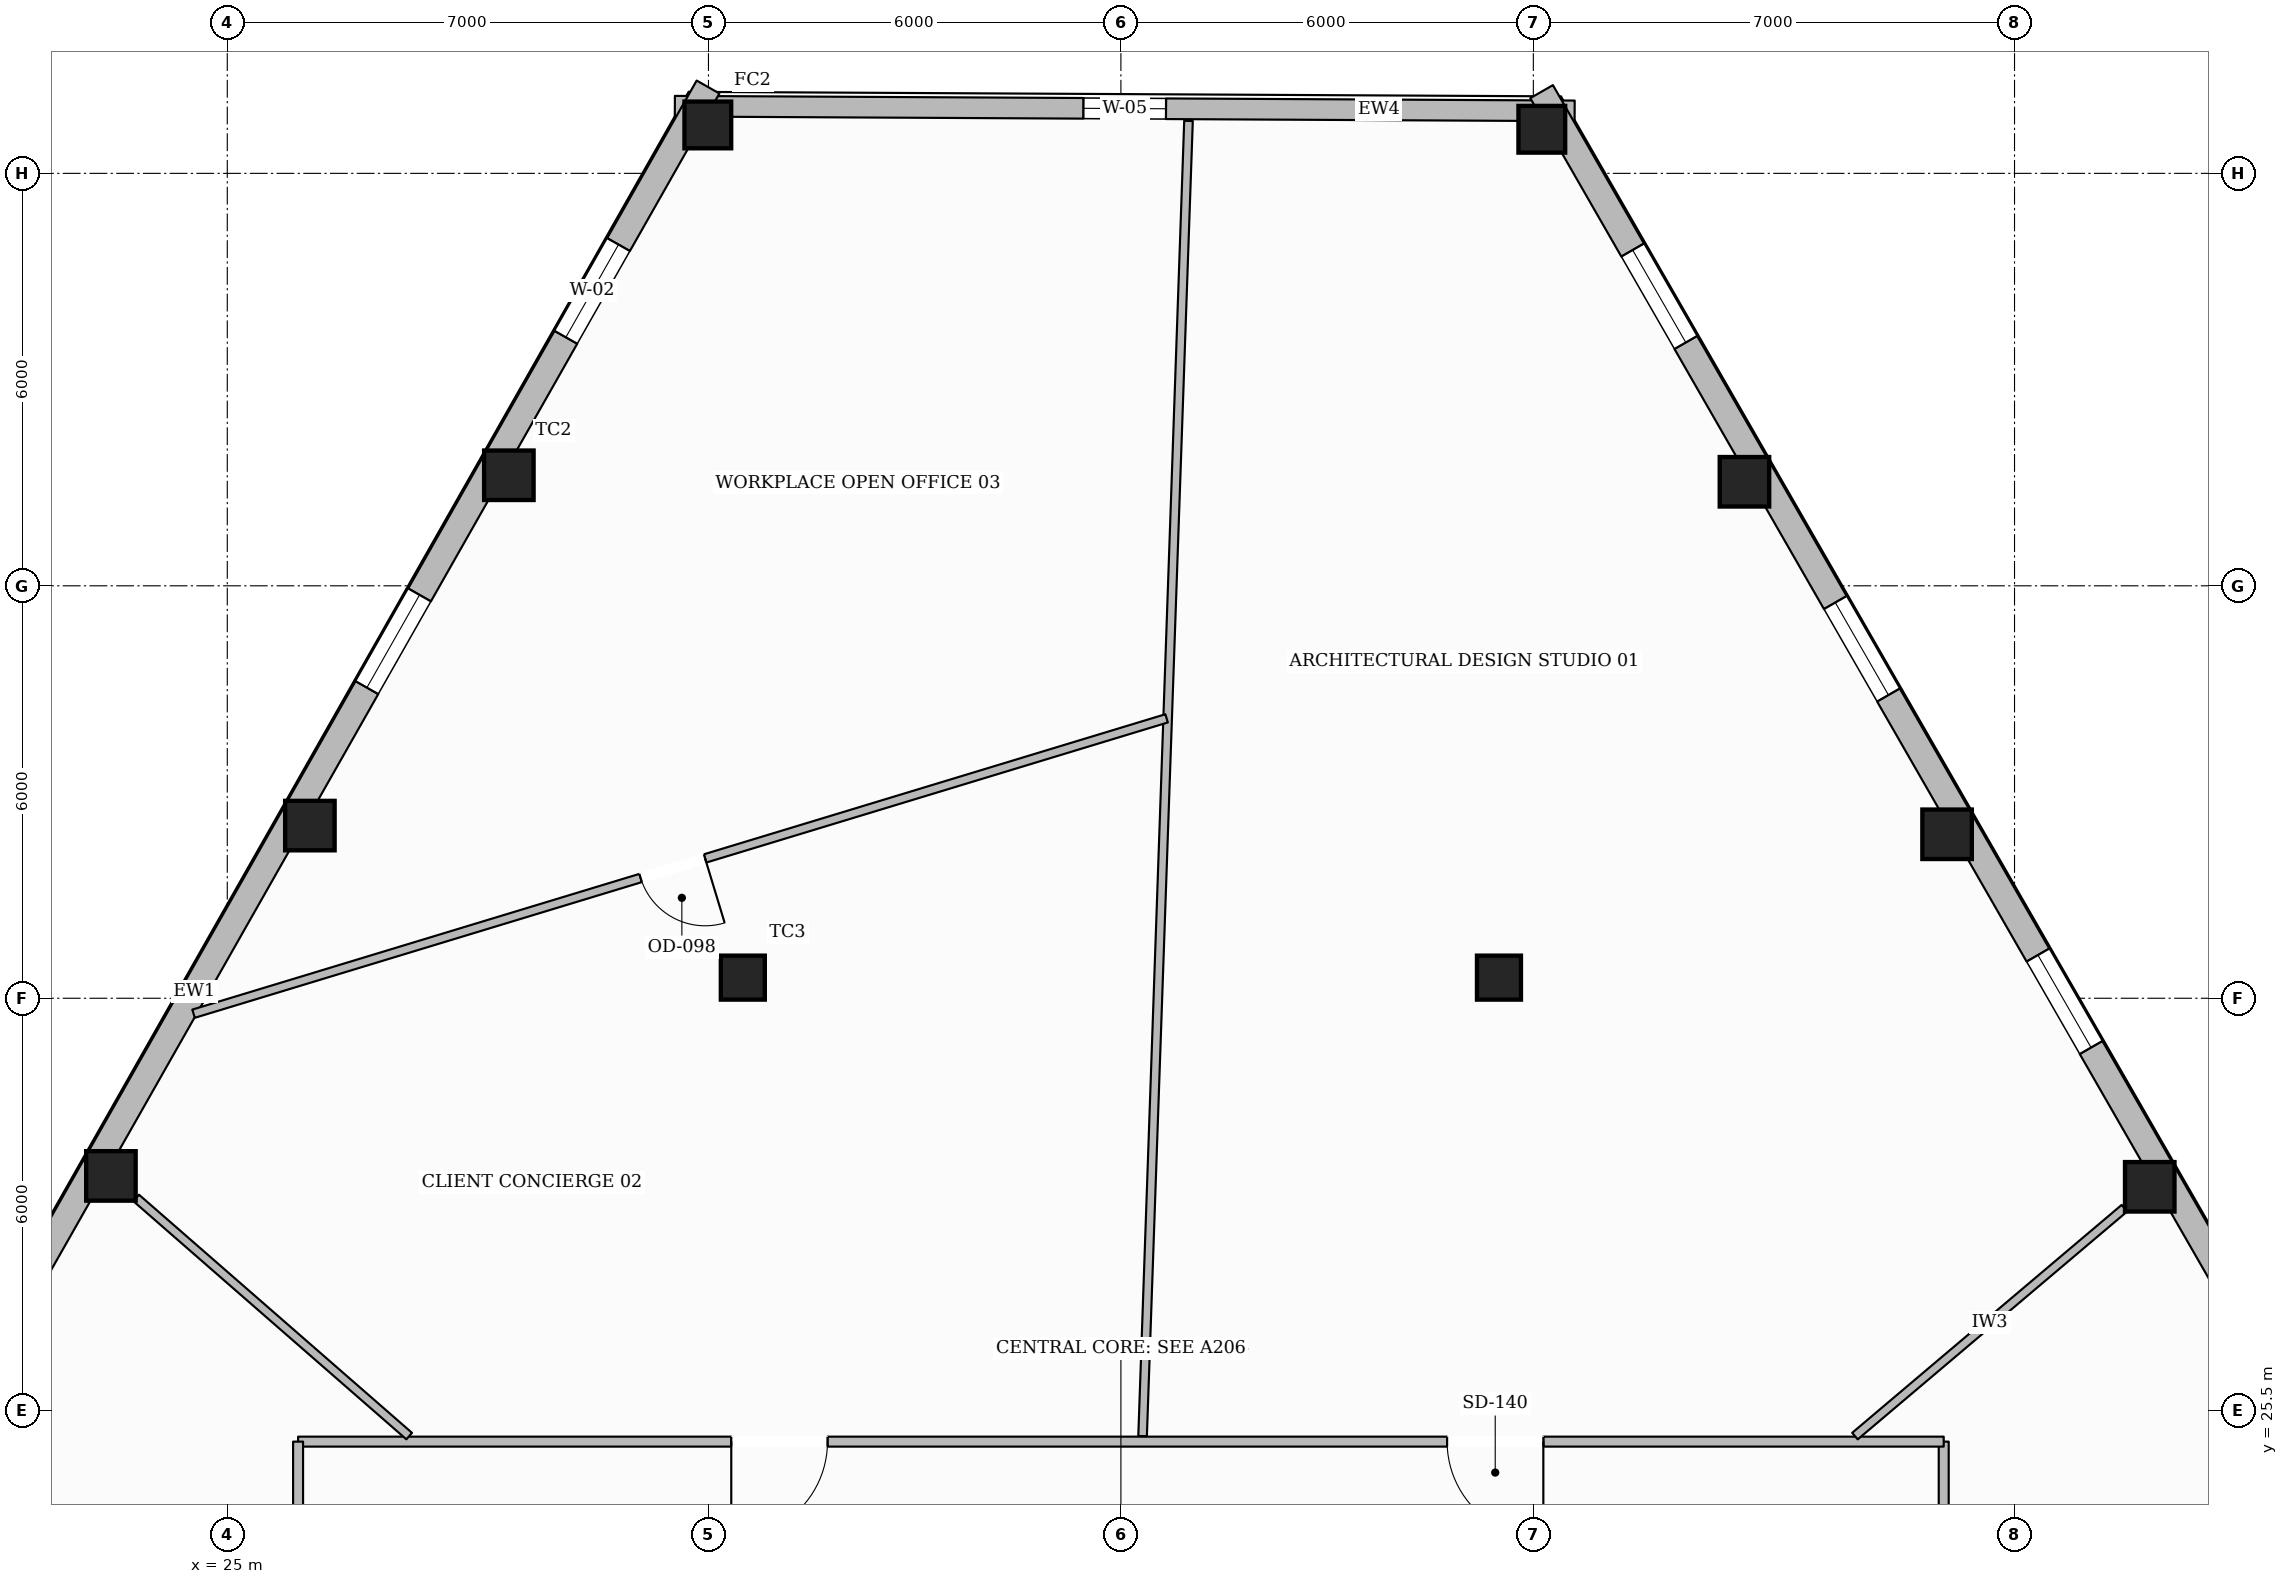
"""IFC4 building model, lengths in metres.
Left out: names, types, materials, properties, quantities, classifications, styles, units other than length and angle.
Written with IfcOpenShell. Run it as: python <this file> out.ifc"""

import sys

from ifc_helpers import new_model, si_unit, direction, frame, frame_2d, origin, origin_2d, place, context, subcontext, project, spatial, rectangle, hollow_rectangle, extrude, element, fill, save


model = new_model("IFC4")
c1 = context("Model", 3, precision=1e-05, world=origin(), true_north=direction((0.0, 1.0)))
c2 = subcontext(c1, "Body", "Model", "MODEL_VIEW")
j1 = project(units=[si_unit("LENGTHUNIT", "METRE"), si_unit("PLANEANGLEUNIT", "RADIAN")], contexts=[c1])
p1 = place(None, origin())
s1 = spatial("IfcSite", under=j1, at=p1, CompositionType="ELEMENT")
p2 = place(p1, origin())
s2 = spatial("IfcBuilding", under=s1, at=p2, CompositionType="ELEMENT")
p3 = place(p2, frame((0.0, 0.0, 108.6)))
s3 = spatial("IfcBuildingStorey", under=s2, at=p3, CompositionType="ELEMENT", Elevation=108.6)
p4 = place(p3, frame((31.991, 44.204, 0.0), z_axis=(0.0, 0.0, 1.0), x_axis=(1.0, 0.0, 0.0)))
e1 = element("IfcColumn", 1, at=p4, inside=s3, PredefinedType="COLUMN", context=c2, shape_type="SweptSolid", body=[
    extrude(hollow_rectangle(XDim=0.68, YDim=0.68, WallThickness=0.03, at=origin_2d()), origin(), (0.0, 0.0, 1.0), 3.6),
])
for number, where, z_axis, x_axis in (
    (2, (29.096, 39.108, 0.0), (0.0, 0.0, 1.0), (1.0, 0.0, 0.0)),
    (3, (26.202, 34.012, 0.0), (0.0, 0.0, 1.0), (1.0, 0.0, 0.0)),
    (4, (23.307, 28.915, 0.0), (0.0, 0.0, 1.0), (1.0, 0.0, 0.0)),
    (5, (52.967, 28.757, 0.0), (0.0, 0.0, 1.0), (1.0, 0.0, 0.0)),
    (6, (50.019, 33.885, 0.0), (0.0, 0.0, 1.0), (1.0, 0.0, 0.0)),
    (7, (47.071, 39.013, 0.0), (0.0, 0.0, 1.0), (1.0, 0.0, 0.0)),
):
    element("IfcColumn", number, at=place(p3, frame(where, z_axis=z_axis, x_axis=x_axis)), inside=s3, PredefinedType="COLUMN", context=c2, shape_type="SweptSolid", body=[
        extrude(hollow_rectangle(XDim=0.72, YDim=0.72, WallThickness=0.032, at=origin_2d()), origin(), (0.0, 0.0, 1.0), 3.6),
    ])
p5 = place(p3, frame((44.123, 44.142, 0.0), z_axis=(0.0, 0.0, 1.0), x_axis=(1.0, 0.0, 0.0)))
e8 = element("IfcColumn", 8, at=p5, inside=s3, PredefinedType="COLUMN", context=c2, shape_type="SweptSolid", body=[
    extrude(hollow_rectangle(XDim=0.68, YDim=0.68, WallThickness=0.03, at=origin_2d()), origin(), (0.0, 0.0, 1.0), 3.6),
])
for number, where, z_axis, x_axis in (
    (9, (32.5, 31.8, 0.0), (0.0, 0.0, 1.0), (1.0, 0.0, 0.0)),
    (10, (43.5, 31.8, 0.0), (0.0, 0.0, 1.0), (1.0, 0.0, 0.0)),
):
    element("IfcColumn", number, at=place(p3, frame(where, z_axis=z_axis, x_axis=x_axis)), inside=s3, PredefinedType="COLUMN", context=c2, shape_type="SweptSolid", body=[
        extrude(hollow_rectangle(XDim=0.64, YDim=0.64, WallThickness=0.028, at=origin_2d()), origin(), (0.0, 0.0, 1.0), 3.6),
    ])
p6 = place(p3, frame((31.511, 44.477, 0.0), z_axis=(0.0, 0.0, 1.0), x_axis=(0.999986654587, -0.005166299301, 0.0)))
e11 = element("IfcWall", 11, at=p6, inside=s3, PredefinedType="STANDARD", context=c2, shape_type="SweptSolid", body=[
    extrude(rectangle(XDim=13.09, YDim=0.3, at=frame_2d((6.545, 0.0))), origin(), (0.0, 0.0, 1.0), 3.059),
])
p7 = place(p6, frame((5.945, 0.0, 0.65)))
e12 = element("IfcOpeningElement", 12, at=p7, cuts=e11, PredefinedType="OPENING", context=c2, shape_type="SweptSolid", body=[
    extrude(rectangle(XDim=1.2, YDim=1.7, at=frame_2d((0.6, 0.85))), frame((0.0, 0.16, 0.0), z_axis=(0.0, -1.0, 0.0), x_axis=(1.0, 0.0, 0.0)), (0.0, 0.0, 1.0), 0.32),
])
p8 = place(p3, frame((14.155, 13.347, 0.0), z_axis=(0.0, 0.0, 1.0), x_axis=(0.493868426836, 0.869536644986, 0.0)))
e13 = element("IfcWall", 13, at=p8, inside=s3, PredefinedType="STANDARD", context=c2, shape_type="SweptSolid", body=[
    extrude(rectangle(XDim=36.121, YDim=0.38, at=frame_2d((18.061, 0.0))), origin(), (0.0, 0.0, 1.0), 3.059),
])
p9 = place(p8, frame((31.935, 0.0, 0.65)))
e14 = element("IfcOpeningElement", 14, at=p9, cuts=e13, PredefinedType="OPENING", context=c2, shape_type="SweptSolid", body=[
    extrude(rectangle(XDim=1.55, YDim=1.75, at=frame_2d((0.775, 0.875))), frame((0.0, 0.2, 0.0), z_axis=(0.0, -1.0, 0.0), x_axis=(1.0, 0.0, 0.0)), (0.0, 0.0, 1.0), 0.4),
])
p10 = place(p8, frame((26.073, 0.0, 0.65)))
e15 = element("IfcOpeningElement", 15, at=p10, cuts=e13, PredefinedType="OPENING", context=c2, shape_type="SweptSolid", body=[
    extrude(rectangle(XDim=1.55, YDim=1.75, at=frame_2d((0.775, 0.875))), frame((0.0, 0.2, 0.0), z_axis=(0.0, -1.0, 0.0), x_axis=(1.0, 0.0, 0.0)), (0.0, 0.0, 1.0), 0.4),
])
p11 = place(p8, frame((14.352, 0.0, 0.65)))
e16 = element("IfcOpeningElement", 16, at=p11, cuts=e13, PredefinedType="OPENING", context=c2, shape_type="SweptSolid", body=[
    extrude(rectangle(XDim=1.55, YDim=1.75, at=frame_2d((0.775, 0.875))), frame((0.0, 0.2, 0.0), z_axis=(0.0, -1.0, 0.0), x_axis=(1.0, 0.0, 0.0)), (0.0, 0.0, 1.0), 0.4),
])
p12 = place(p8, frame((8.491, 0.0, 0.65)))
e17 = element("IfcOpeningElement", 17, at=p12, cuts=e13, PredefinedType="OPENING", context=c2, shape_type="SweptSolid", body=[
    extrude(rectangle(XDim=1.55, YDim=1.75, at=frame_2d((0.775, 0.875))), frame((0.0, 0.2, 0.0), z_axis=(0.0, -1.0, 0.0), x_axis=(1.0, 0.0, 0.0)), (0.0, 0.0, 1.0), 0.4),
])
p13 = place(p8, frame((2.63, 0.0, 0.65)))
e18 = element("IfcOpeningElement", 18, at=p13, cuts=e13, PredefinedType="OPENING", context=c2, shape_type="SweptSolid", body=[
    extrude(rectangle(XDim=1.55, YDim=1.75, at=frame_2d((0.775, 0.875))), frame((0.0, 0.2, 0.0), z_axis=(0.0, -1.0, 0.0), x_axis=(1.0, 0.0, 0.0)), (0.0, 0.0, 1.0), 0.4),
])
p14 = place(p3, frame((44.12, 44.689, 0.0), z_axis=(0.0, 0.0, 1.0), x_axis=(0.498376840975, -0.866960509124, 0.0)))
e19 = element("IfcWall", 19, at=p14, inside=s3, PredefinedType="STANDARD", context=c2, shape_type="SweptSolid", body=[
    extrude(rectangle(XDim=36.441, YDim=0.38, at=frame_2d((18.22, 0.0))), origin(), (0.0, 0.0, 1.0), 3.059),
])
p15 = place(p14, frame((32.234, 0.0, 0.65)))
e20 = element("IfcOpeningElement", 20, at=p15, cuts=e19, PredefinedType="OPENING", context=c2, shape_type="SweptSolid", body=[
    extrude(rectangle(XDim=1.55, YDim=1.75, at=frame_2d((0.775, 0.875))), frame((0.0, 0.2, 0.0), z_axis=(0.0, -1.0, 0.0), x_axis=(1.0, 0.0, 0.0)), (0.0, 0.0, 1.0), 0.4),
])
p16 = place(p14, frame((26.319, 0.0, 0.65)))
e21 = element("IfcOpeningElement", 21, at=p16, cuts=e19, PredefinedType="OPENING", context=c2, shape_type="SweptSolid", body=[
    extrude(rectangle(XDim=1.55, YDim=1.75, at=frame_2d((0.775, 0.875))), frame((0.0, 0.2, 0.0), z_axis=(0.0, -1.0, 0.0), x_axis=(1.0, 0.0, 0.0)), (0.0, 0.0, 1.0), 0.4),
])
p17 = place(p14, frame((14.489, 0.0, 0.65)))
e22 = element("IfcOpeningElement", 22, at=p17, cuts=e19, PredefinedType="OPENING", context=c2, shape_type="SweptSolid", body=[
    extrude(rectangle(XDim=1.55, YDim=1.75, at=frame_2d((0.775, 0.875))), frame((0.0, 0.2, 0.0), z_axis=(0.0, -1.0, 0.0), x_axis=(1.0, 0.0, 0.0)), (0.0, 0.0, 1.0), 0.4),
])
p18 = place(p14, frame((8.573, 0.0, 0.65)))
e23 = element("IfcOpeningElement", 23, at=p18, cuts=e19, PredefinedType="OPENING", context=c2, shape_type="SweptSolid", body=[
    extrude(rectangle(XDim=1.55, YDim=1.75, at=frame_2d((0.775, 0.875))), frame((0.0, 0.2, 0.0), z_axis=(0.0, -1.0, 0.0), x_axis=(1.0, 0.0, 0.0)), (0.0, 0.0, 1.0), 0.4),
])
p19 = place(p14, frame((2.658, 0.0, 0.65)))
e24 = element("IfcOpeningElement", 24, at=p19, cuts=e19, PredefinedType="OPENING", context=c2, shape_type="SweptSolid", body=[
    extrude(rectangle(XDim=1.55, YDim=1.75, at=frame_2d((0.775, 0.875))), frame((0.0, 0.2, 0.0), z_axis=(0.0, -1.0, 0.0), x_axis=(1.0, 0.0, 0.0)), (0.0, 0.0, 1.0), 0.4),
])
p20 = place(p3, frame((49.97, 7.15, 0.0), z_axis=(0.0, 0.0, 1.0), x_axis=(0.0, 1.0, 0.0)))
e25 = element("IfcWall", 25, at=p20, inside=s3, PredefinedType="PARTITIONING", context=c2, shape_type="SweptSolid", body=[
    extrude(rectangle(XDim=17.9, YDim=0.145, at=frame_2d((8.95, 0.0))), origin(), (0.0, 0.0, 1.0), 3.288),
])
p21 = place(p20, frame((8.25, 0.0, 0.0)))
e26 = element("IfcOpeningElement", 26, at=p21, cuts=e25, PredefinedType="OPENING", context=c2, shape_type="SweptSolid", body=[
    extrude(rectangle(XDim=1.4, YDim=2.2, at=frame_2d((0.7, 1.1))), frame((0.0, 0.083, 0.0), z_axis=(0.0, -1.0, 0.0), x_axis=(1.0, 0.0, 0.0)), (0.0, 0.0, 1.0), 0.165),
])
p22 = place(p3, frame((49.97, 25.05, 0.0), z_axis=(0.0, 0.0, 1.0), x_axis=(-1.0, 0.0, 0.0)))
e27 = element("IfcWall", 27, at=p22, inside=s3, PredefinedType="PARTITIONING", context=c2, shape_type="SweptSolid", body=[
    extrude(rectangle(XDim=23.94, YDim=0.145, at=frame_2d((11.97, 0.0))), origin(), (0.0, 0.0, 1.0), 3.6),
])
p23 = place(p22, frame((5.824, 0.0, 0.0)))
e28 = element("IfcOpeningElement", 28, at=p23, cuts=e27, PredefinedType="OPENING", context=c2, shape_type="SweptSolid", body=[
    extrude(rectangle(XDim=1.4, YDim=2.2, at=frame_2d((0.7, 1.1))), frame((0.0, 0.083, 0.0), z_axis=(0.0, -1.0, 0.0), x_axis=(1.0, 0.0, 0.0)), (0.0, 0.0, 1.0), 0.165),
])
p24 = place(p22, frame((16.238, 0.0, 0.0)))
e29 = element("IfcOpeningElement", 29, at=p24, cuts=e27, PredefinedType="OPENING", context=c2, shape_type="SweptSolid", body=[
    extrude(rectangle(XDim=1.4, YDim=2.2, at=frame_2d((0.7, 1.1))), frame((0.0, 0.083, 0.0), z_axis=(0.0, -1.0, 0.0), x_axis=(1.0, 0.0, 0.0)), (0.0, 0.0, 1.0), 0.165),
])
p25 = place(p3, frame((26.03, 25.05, 0.0), z_axis=(0.0, 0.0, 1.0), x_axis=(0.0, -1.0, 0.0)))
e30 = element("IfcWall", 30, at=p25, inside=s3, PredefinedType="PARTITIONING", context=c2, shape_type="SweptSolid", body=[
    extrude(rectangle(XDim=17.9, YDim=0.145, at=frame_2d((8.95, 0.0))), origin(), (0.0, 0.0, 1.0), 3.288),
])
p26 = place(p25, frame((7.016, 0.0, 0.0)))
e31 = element("IfcOpeningElement", 31, at=p26, cuts=e30, PredefinedType="OPENING", context=c2, shape_type="SweptSolid", body=[
    extrude(rectangle(XDim=1.4, YDim=2.2, at=frame_2d((0.7, 1.1))), frame((0.0, 0.083, 0.0), z_axis=(0.0, -1.0, 0.0), x_axis=(1.0, 0.0, 0.0)), (0.0, 0.0, 1.0), 0.165),
])
p27 = place(p3, frame((48.679, 25.131, 0.0), z_axis=(0.0, 0.0, 1.0), x_axis=(0.763563012799, 0.645733323815, 0.0)))
e32 = element("IfcWall", 32, at=p27, inside=s3, PredefinedType="PARTITIONING", context=c2, shape_type="SweptSolid", body=[
    extrude(rectangle(XDim=5.134, YDim=0.125, at=frame_2d((2.567, 0.0))), origin(), (0.0, 0.0, 1.0), 3.141),
])
p28 = place(p3, frame((38.315, 25.131, 0.0), z_axis=(0.0, 0.0, 1.0), x_axis=(0.03489139659, 0.999391109848, 0.0)))
e33 = element("IfcWall", 33, at=p28, inside=s3, PredefinedType="PARTITIONING", context=c2, shape_type="SweptSolid", body=[
    extrude(rectangle(XDim=19.144, YDim=0.125, at=frame_2d((9.572, 0.0))), origin(), (0.0, 0.0, 1.0), 3.6),
])
p29 = place(p3, frame((27.646, 25.131, 0.0), z_axis=(0.0, 0.0, 1.0), x_axis=(-0.753603237889, 0.657329567145, 0.0)))
e34 = element("IfcWall", 34, at=p29, inside=s3, PredefinedType="PARTITIONING", context=c2, shape_type="SweptSolid", body=[
    extrude(rectangle(XDim=5.27, YDim=0.125, at=frame_2d((2.635, 0.0))), origin(), (0.0, 0.0, 1.0), 3.141),
])
p30 = place(p3, frame((38.665, 35.572, 0.0), z_axis=(0.0, 0.0, 1.0), x_axis=(-0.956891470712, -0.290445714856, 0.0)))
e35 = element("IfcWall", 35, at=p30, inside=s3, PredefinedType="PARTITIONING", context=c2, shape_type="SweptSolid", body=[
    extrude(rectangle(XDim=14.793, YDim=0.125, at=frame_2d((7.396, 0.0))), origin(), (0.0, 0.0, 1.0), 3.288),
])
p31 = place(p30, frame((7.016, 0.0, 0.0)))
e36 = element("IfcOpeningElement", 36, at=p31, cuts=e35, PredefinedType="OPENING", context=c2, shape_type="SweptSolid", body=[
    extrude(rectangle(XDim=0.98, YDim=2.15, at=frame_2d((0.49, 1.075))), frame((0.0, 0.073, 0.0), z_axis=(0.0, -1.0, 0.0), x_axis=(1.0, 0.0, 0.0)), (0.0, 0.0, 1.0), 0.145),
])
p32 = place(p9, origin())
e37 = element("IfcWindow", 37, at=p32, inside=s3, PartitioningType="SINGLE_PANEL", PredefinedType="WINDOW", context=c2, shape_type="SweptSolid", body=[
    extrude(rectangle(XDim=1.55, YDim=1.75, at=frame_2d((0.775, 0.875))), frame((0.0, 0.03, 0.0), z_axis=(0.0, -1.0, 0.0), x_axis=(1.0, 0.0, 0.0)), (0.0, 0.0, 1.0), 0.06),
])
fill(e14, e37)
p33 = place(p10, origin())
e38 = element("IfcWindow", 38, at=p33, inside=s3, PartitioningType="SINGLE_PANEL", PredefinedType="WINDOW", context=c2, shape_type="SweptSolid", body=[
    extrude(rectangle(XDim=1.55, YDim=1.75, at=frame_2d((0.775, 0.875))), frame((0.0, 0.03, 0.0), z_axis=(0.0, -1.0, 0.0), x_axis=(1.0, 0.0, 0.0)), (0.0, 0.0, 1.0), 0.06),
])
fill(e15, e38)
p34 = place(p17, origin())
e39 = element("IfcWindow", 39, at=p34, inside=s3, PartitioningType="SINGLE_PANEL", PredefinedType="WINDOW", context=c2, shape_type="SweptSolid", body=[
    extrude(rectangle(XDim=1.55, YDim=1.75, at=frame_2d((0.775, 0.875))), frame((0.0, 0.03, 0.0), z_axis=(0.0, -1.0, 0.0), x_axis=(1.0, 0.0, 0.0)), (0.0, 0.0, 1.0), 0.06),
])
fill(e22, e39)
p35 = place(p18, origin())
e40 = element("IfcWindow", 40, at=p35, inside=s3, PartitioningType="SINGLE_PANEL", PredefinedType="WINDOW", context=c2, shape_type="SweptSolid", body=[
    extrude(rectangle(XDim=1.55, YDim=1.75, at=frame_2d((0.775, 0.875))), frame((0.0, 0.03, 0.0), z_axis=(0.0, -1.0, 0.0), x_axis=(1.0, 0.0, 0.0)), (0.0, 0.0, 1.0), 0.06),
])
fill(e23, e40)
p36 = place(p19, origin())
e41 = element("IfcWindow", 41, at=p36, inside=s3, PartitioningType="SINGLE_PANEL", PredefinedType="WINDOW", context=c2, shape_type="SweptSolid", body=[
    extrude(rectangle(XDim=1.55, YDim=1.75, at=frame_2d((0.775, 0.875))), frame((0.0, 0.03, 0.0), z_axis=(0.0, -1.0, 0.0), x_axis=(1.0, 0.0, 0.0)), (0.0, 0.0, 1.0), 0.06),
])
fill(e24, e41)
p37 = place(p7, origin())
e42 = element("IfcWindow", 42, at=p37, inside=s3, PartitioningType="SINGLE_PANEL", PredefinedType="WINDOW", context=c2, shape_type="SweptSolid", body=[
    extrude(rectangle(XDim=1.2, YDim=1.7, at=frame_2d((0.6, 0.85))), frame((0.0, 0.03, 0.0), z_axis=(0.0, -1.0, 0.0), x_axis=(1.0, 0.0, 0.0)), (0.0, 0.0, 1.0), 0.06),
])
fill(e12, e42)
p38 = place(p23, origin())
e43 = element("IfcDoor", 43, at=p38, inside=s3, OperationType="SINGLE_SWING_LEFT", PredefinedType="DOOR", context=c2, shape_type="SweptSolid", body=[
    extrude(rectangle(XDim=1.4, YDim=2.2, at=frame_2d((0.7, 1.1))), frame((0.0, 0.025, 0.0), z_axis=(0.0, -1.0, 0.0), x_axis=(1.0, 0.0, 0.0)), (0.0, 0.0, 1.0), 0.05),
])
fill(e28, e43)
p39 = place(p24, origin())
e44 = element("IfcDoor", 44, at=p39, inside=s3, OperationType="SINGLE_SWING_RIGHT", PredefinedType="DOOR", context=c2, shape_type="SweptSolid", body=[
    extrude(rectangle(XDim=1.4, YDim=2.2, at=frame_2d((0.7, 1.1))), frame((0.0, 0.025, 0.0), z_axis=(0.0, -1.0, 0.0), x_axis=(1.0, 0.0, 0.0)), (0.0, 0.0, 1.0), 0.05),
])
fill(e29, e44)
p40 = place(p31, origin())
e45 = element("IfcDoor", 45, at=p40, inside=s3, OperationType="SINGLE_SWING_LEFT", PredefinedType="DOOR", context=c2, shape_type="SweptSolid", body=[
    extrude(rectangle(XDim=0.98, YDim=2.15, at=frame_2d((0.49, 1.075))), frame((0.0, 0.025, 0.0), z_axis=(0.0, -1.0, 0.0), x_axis=(1.0, 0.0, 0.0)), (0.0, 0.0, 1.0), 0.05),
])
fill(e36, e45)
save(model, sys.argv[1])
